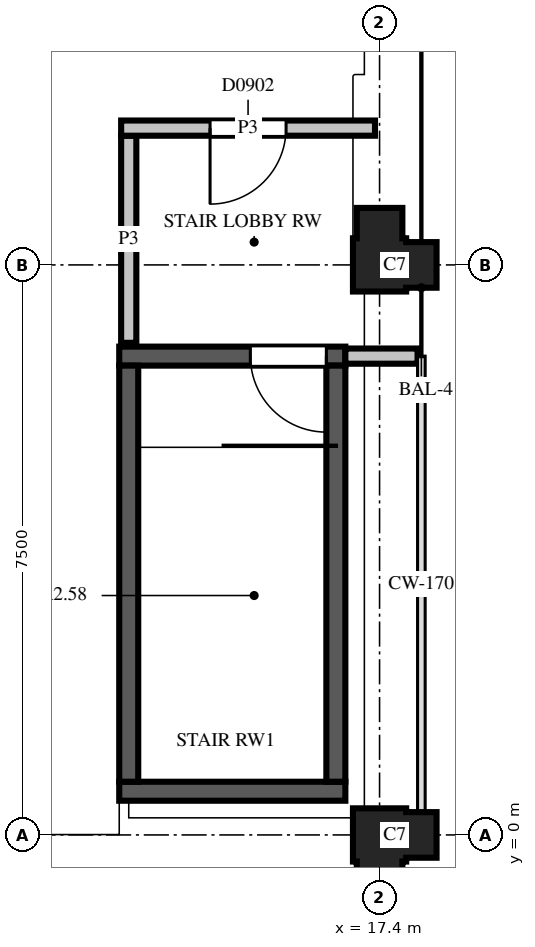
"""IFC4 building model, lengths in metres.
Left out: names, types, materials, properties, quantities, classifications, styles, units other than length and angle.
Written with IfcOpenShell. Run it as: python <this file> out.ifc"""

import sys

from ifc_helpers import new_model, si_unit, direction, frame, frame_2d, origin, place, context, subcontext, project, spatial, polyline, rectangle, outline, extrude, element, fill, save


model = new_model("IFC4")
c1 = context("Model", 3, precision=1e-05, world=origin(), true_north=direction((0.0, 1.0)))
c2 = subcontext(c1, "Body", "Model", "MODEL_VIEW")
j1 = project(units=[si_unit("LENGTHUNIT", "METRE"), si_unit("PLANEANGLEUNIT", "RADIAN")], contexts=[c1])
p1 = place(None, origin())
s1 = spatial("IfcSite", under=j1, at=p1, CompositionType="ELEMENT")
p2 = place(p1, origin())
s2 = spatial("IfcBuilding", under=s1, at=p2, CompositionType="ELEMENT")
p3 = place(p2, frame((0.0, 0.0, 34.1)))
s3 = spatial("IfcBuildingStorey", under=s2, at=p3, CompositionType="ELEMENT", Elevation=34.1)
for number, where, z_axis, x_axis in (
    (1, (17.4, 0.0, 0.0), (0.0, 0.0, 1.0), (0.0, -1.0, 0.0)),
    (2, (17.4, 7.5, 0.0), (0.0, 0.0, 1.0), (1.0, 0.0, 0.0)),
):
    element("IfcColumn", number, at=place(p3, frame(where, z_axis=z_axis, x_axis=x_axis)), inside=s3, PredefinedType="COLUMN", context=c2, shape_type="SweptSolid", body=[
        extrude(outline(polyline([(-0.35, -0.35), (0.35, -0.35), (0.35, -0.3), (0.75, -0.3), (0.75, 0.3), (0.35, 0.3), (0.35, 0.35), (0.3, 0.35), (0.3, 0.75), (-0.3, 0.75), (-0.3, 0.35), (-0.35, 0.35), (-0.35, -0.35)])), origin(), (0.0, 0.0, 1.0), 3.7),
    ])
p4 = place(p3, frame((13.975, 0.575, 0.0), z_axis=(0.0, 0.0, 1.0), x_axis=(1.0, 0.0, 0.0)))
e3 = element("IfcWall", 3, at=p4, inside=s3, PredefinedType="SHEAR", context=c2, shape_type="SweptSolid", body=[
    extrude(rectangle(XDim=2.975, YDim=0.25, at=frame_2d((1.487, 0.0))), origin(), (0.0, 0.0, 1.0), 3.35),
])
p5 = place(p3, frame((13.975, 6.3, 0.0), z_axis=(0.0, 0.0, 1.0), x_axis=(1.0, 0.0, 0.0)))
e4 = element("IfcWall", 4, at=p5, inside=s3, PredefinedType="SHEAR", context=c2, shape_type="SweptSolid", body=[
    extrude(rectangle(XDim=2.975, YDim=0.25, at=frame_2d((1.487, 0.0))), origin(), (0.0, 0.0, 1.0), 3.35),
])
p6 = place(p5, frame((1.725, 0.0, 0.0)))
e5 = element("IfcOpeningElement", 5, at=p6, cuts=e4, PredefinedType="OPENING", context=c2, shape_type="SweptSolid", body=[
    extrude(rectangle(XDim=1.0, YDim=2.1, at=frame_2d((0.5, 1.05))), frame((0.0, 0.135, 0.0), z_axis=(0.0, -1.0, 0.0), x_axis=(1.0, 0.0, 0.0)), (0.0, 0.0, 1.0), 0.27),
])
for number, where, z_axis, x_axis in (
    (6, (14.1, 0.7, 0.0), (0.0, 0.0, 1.0), (0.0, 1.0, 0.0)),
    (7, (16.825, 0.7, 0.0), (0.0, 0.0, 1.0), (0.0, 1.0, 0.0)),
):
    element("IfcWall", number, at=place(p3, frame(where, z_axis=z_axis, x_axis=x_axis)), inside=s3, PredefinedType="SHEAR", context=c2, shape_type="SweptSolid", body=[
        extrude(rectangle(XDim=5.475, YDim=0.25, at=frame_2d((2.738, 0.0))), origin(), (0.0, 0.0, 1.0), 3.35),
    ])
p7 = place(p3, frame((16.95, 6.3, 0.0), z_axis=(0.0, 0.0, 1.0), x_axis=(1.0, 0.0, 0.0)))
e8 = element("IfcWall", 8, at=p7, inside=s3, PredefinedType="PARTITIONING", context=c2, shape_type="SweptSolid", body=[
    extrude(rectangle(XDim=0.95, YDim=0.2, at=frame_2d((0.475, 0.0))), origin(), (0.0, 0.0, 1.0), 2.88),
])
p8 = place(p3, frame((14.1, 9.2, 0.0), z_axis=(0.0, 0.0, 1.0), x_axis=(0.0, -1.0, 0.0)))
e9 = element("IfcWall", 9, at=p8, inside=s3, PredefinedType="PARTITIONING", context=c2, shape_type="SweptSolid", body=[
    extrude(rectangle(XDim=2.725, YDim=0.2, at=frame_2d((1.362, 0.0))), origin(), (0.0, 0.0, 1.0), 2.88),
])
p9 = place(p3, frame((17.34, 9.3, 0.0), z_axis=(0.0, 0.0, 1.0), x_axis=(-1.0, 0.0, 0.0)))
e10 = element("IfcWall", 10, at=p9, inside=s3, PredefinedType="PARTITIONING", context=c2, shape_type="SweptSolid", body=[
    extrude(rectangle(XDim=3.34, YDim=0.2, at=frame_2d((1.67, 0.0))), origin(), (0.0, 0.0, 1.0), 2.88),
])
p10 = place(p9, frame((1.17, 0.0, 0.0)))
e11 = element("IfcOpeningElement", 11, at=p10, cuts=e10, PredefinedType="OPENING", context=c2, shape_type="SweptSolid", body=[
    extrude(rectangle(XDim=1.0, YDim=2.1, at=frame_2d((0.5, 1.05))), frame((0.0, 0.11, 0.0), z_axis=(0.0, -1.0, 0.0), x_axis=(1.0, 0.0, 0.0)), (0.0, 0.0, 1.0), 0.22),
])
p11 = place(p10, origin())
e12 = element("IfcDoor", 12, at=p11, inside=s3, OperationType="SINGLE_SWING_LEFT", PredefinedType="DOOR", context=c2, shape_type="SweptSolid", body=[
    extrude(rectangle(XDim=1.0, YDim=2.1, at=frame_2d((0.5, 1.05))), frame((0.0, 0.025, 0.0), z_axis=(0.0, -1.0, 0.0), x_axis=(1.0, 0.0, 0.0)), (0.0, 0.0, 1.0), 0.05),
])
fill(e11, e12)
p12 = place(p6, origin())
e13 = element("IfcDoor", 13, at=p12, inside=s3, OperationType="SINGLE_SWING_RIGHT", PredefinedType="DOOR", context=c2, shape_type="SweptSolid", body=[
    extrude(rectangle(XDim=1.0, YDim=2.1, at=frame_2d((0.5, 1.05))), frame((0.0, 0.025, 0.0), z_axis=(0.0, -1.0, 0.0), x_axis=(1.0, 0.0, 0.0)), (0.0, 0.0, 1.0), 0.05),
])
fill(e5, e13)
save(model, sys.argv[1])
